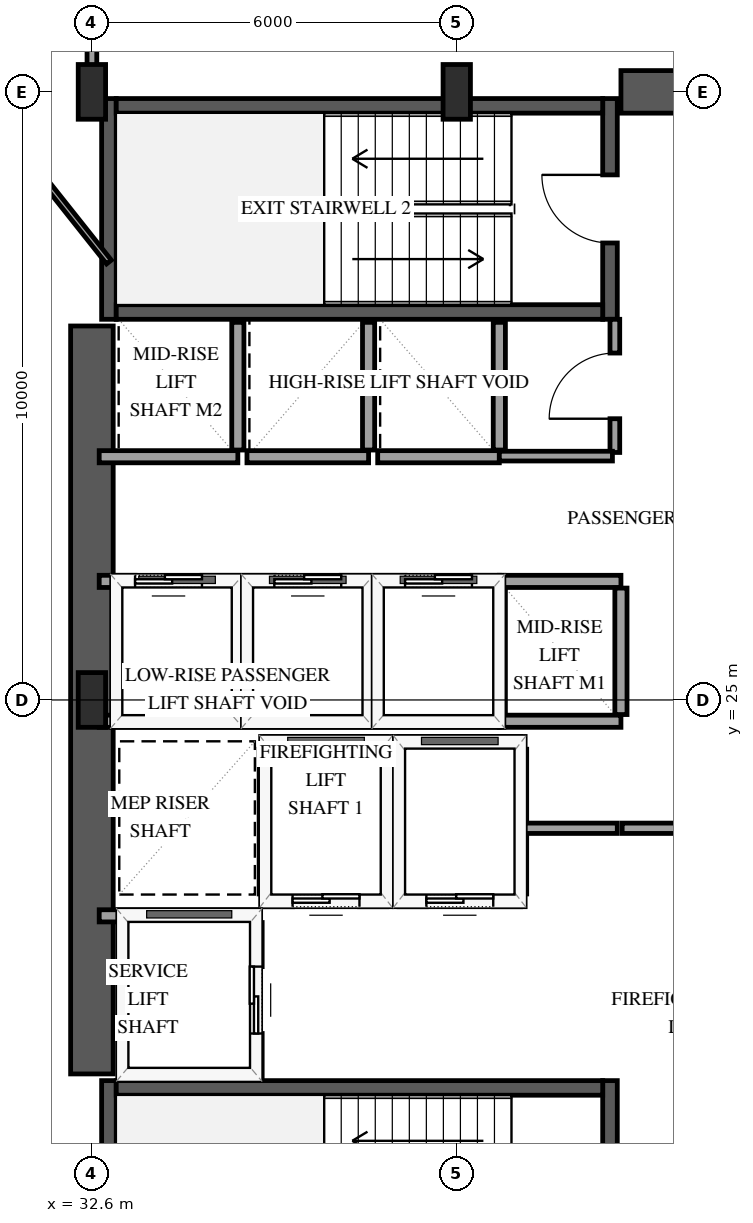
"""IFC4 building model, lengths in metres.
Left out: names, types, materials, properties, quantities, classifications, styles, units other than length and angle.
Written with IfcOpenShell. Run it as: python <this file> out.ifc"""

import sys

from ifc_helpers import new_model, si_unit, direction, frame, frame_2d, origin, origin_2d, place, context, subcontext, project, spatial, rectangle, extrude, element, fill, save


model = new_model("IFC4")
c1 = context("Model", 3, precision=1e-05, world=origin(), true_north=direction((0.0, 1.0)))
c2 = subcontext(c1, "Body", "Model", "MODEL_VIEW")
j1 = project(units=[si_unit("LENGTHUNIT", "METRE"), si_unit("PLANEANGLEUNIT", "RADIAN")], contexts=[c1])
p1 = place(None, origin())
s1 = spatial("IfcSite", under=j1, at=p1, CompositionType="ELEMENT")
p2 = place(p1, origin())
s2 = spatial("IfcBuilding", under=s1, at=p2, CompositionType="ELEMENT")
p3 = place(p2, frame((0.0, 0.0, 42.6)))
s3 = spatial("IfcBuildingStorey", under=s2, at=p3, CompositionType="ELEMENT", Elevation=42.6)
p4 = place(p3, frame((32.88, 15.11, 0.0), z_axis=(0.0, 0.0, 1.0), x_axis=(0.0, 1.0, 0.0)))
e1 = element("IfcWall", 1, at=p4, inside=s3, PredefinedType="SHEAR", context=c2, shape_type="SweptSolid", body=[
    extrude(rectangle(XDim=3.63, YDim=0.24, at=frame_2d((1.815, 0.0))), origin(), (0.0, 0.0, 1.0), 4.0),
])
p5 = place(p3, frame((41.12, 15.11, 0.0), z_axis=(0.0, 0.0, 1.0), x_axis=(0.0, 1.0, 0.0)))
e2 = element("IfcWall", 2, at=p5, inside=s3, PredefinedType="SHEAR", context=c2, shape_type="SweptSolid", body=[
    extrude(rectangle(XDim=3.63, YDim=0.24, at=frame_2d((1.815, 0.0))), origin(), (0.0, 0.0, 1.0), 4.0),
])
p6 = place(p5, frame((1.255, 0.0, 0.0)))
e3 = element("IfcOpeningElement", 3, at=p6, cuts=e2, PredefinedType="OPENING", context=c2, shape_type="SweptSolid", body=[
    extrude(rectangle(XDim=1.12, YDim=2.15, at=frame_2d((0.56, 1.075))), frame((0.0, 0.13, 0.0), z_axis=(0.0, -1.0, 0.0), x_axis=(1.0, 0.0, 0.0)), (0.0, 0.0, 1.0), 0.26),
])
p7 = place(p3, frame((33.0, 18.62, 0.0), z_axis=(0.0, 0.0, 1.0), x_axis=(1.0, 0.0, 0.0)))
e4 = element("IfcWall", 4, at=p7, inside=s3, PredefinedType="SHEAR", context=c2, shape_type="SweptSolid", body=[
    extrude(rectangle(XDim=8.0, YDim=0.24, at=frame_2d((4.0, 0.0))), origin(), (0.0, 0.0, 1.0), 4.0),
])
p8 = place(p3, frame((32.88, 31.26, 0.0), z_axis=(0.0, 0.0, 1.0), x_axis=(0.0, 1.0, 0.0)))
e5 = element("IfcWall", 5, at=p8, inside=s3, PredefinedType="SHEAR", context=c2, shape_type="SweptSolid", body=[
    extrude(rectangle(XDim=3.63, YDim=0.24, at=frame_2d((1.815, 0.0))), origin(), (0.0, 0.0, 1.0), 4.0),
])
p9 = place(p3, frame((41.12, 31.26, 0.0), z_axis=(0.0, 0.0, 1.0), x_axis=(0.0, 1.0, 0.0)))
e6 = element("IfcWall", 6, at=p9, inside=s3, PredefinedType="SHEAR", context=c2, shape_type="SweptSolid", body=[
    extrude(rectangle(XDim=3.63, YDim=0.24, at=frame_2d((1.815, 0.0))), origin(), (0.0, 0.0, 1.0), 4.0),
])
p10 = place(p9, frame((1.255, 0.0, 0.0)))
e7 = element("IfcOpeningElement", 7, at=p10, cuts=e6, PredefinedType="OPENING", context=c2, shape_type="SweptSolid", body=[
    extrude(rectangle(XDim=1.12, YDim=2.15, at=frame_2d((0.56, 1.075))), frame((0.0, 0.13, 0.0), z_axis=(0.0, -1.0, 0.0), x_axis=(1.0, 0.0, 0.0)), (0.0, 0.0, 1.0), 0.26),
])
for number, where, z_axis, x_axis in (
    (8, (33.0, 31.38, 0.0), (0.0, 0.0, 1.0), (1.0, 0.0, 0.0)),
    (9, (33.0, 34.77, 0.0), (0.0, 0.0, 1.0), (1.0, 0.0, 0.0)),
):
    element("IfcWall", number, at=place(p3, frame(where, z_axis=z_axis, x_axis=x_axis)), inside=s3, PredefinedType="SHEAR", context=c2, shape_type="SweptSolid", body=[
        extrude(rectangle(XDim=8.0, YDim=0.24, at=frame_2d((4.0, 0.0))), origin(), (0.0, 0.0, 1.0), 4.0),
    ])
p11 = place(p3, frame((32.6, 18.85, 0.0), z_axis=(0.0, 0.0, 1.0), x_axis=(0.0, 1.0, 0.0)))
e10 = element("IfcWall", 10, at=p11, inside=s3, PredefinedType="SHEAR", context=c2, shape_type="SweptSolid", body=[
    extrude(rectangle(XDim=12.3, YDim=0.7, at=frame_2d((6.15, 0.0))), origin(), (0.0, 0.0, 1.0), 4.0),
])
p12 = place(p3, frame((41.3, 35.0, 0.0), z_axis=(0.0, 0.0, 1.0), x_axis=(1.0, 0.0, 0.0)))
e11 = element("IfcWall", 11, at=p12, inside=s3, PredefinedType="SHEAR", context=c2, shape_type="SweptSolid", body=[
    extrude(rectangle(XDim=2.85, YDim=0.7, at=frame_2d((1.425, 0.0))), origin(), (0.0, 0.0, 1.0), 4.0),
])
for number, where, z_axis, x_axis in (
    (12, (32.6, 25.0, 0.0), (0.0, 0.0, 1.0), (1.0, 0.0, 0.0)),
    (13, (32.6, 35.0, 0.0), (0.0, 0.0, 1.0), (1.0, 0.0, 0.0)),
    (14, (38.6, 35.0, 0.0), (0.0, 0.0, 1.0), (1.0, 0.0, 0.0)),
):
    element("IfcColumn", number, at=place(p3, frame(where, z_axis=z_axis, x_axis=x_axis)), inside=s3, PredefinedType="PILASTER", context=c2, shape_type="SweptSolid", body=[
        extrude(rectangle(XDim=0.45, YDim=0.9, at=origin_2d()), origin(), (0.0, 0.0, 1.0), 4.0),
    ])
p13 = place(p3, frame((35.45, 21.7, 0.0), z_axis=(0.0, 0.0, 1.0), x_axis=(1.0, 0.0, 0.0)))
e15 = element("IfcWall", 15, at=p13, inside=s3, PredefinedType="SOLIDWALL", context=c2, shape_type="SweptSolid", body=[
    extrude(rectangle(XDim=2.0, YDim=0.2, at=frame_2d((1.0, 0.0))), origin(), (0.0, 0.0, 1.0), 3.7),
])
p14 = place(p13, frame((0.45, 0.0, 0.0)))
e16 = element("IfcOpeningElement", 16, at=p14, cuts=e15, PredefinedType="OPENING", context=c2, shape_type="SweptSolid", body=[
    extrude(rectangle(XDim=1.1, YDim=2.15, at=frame_2d((0.55, 1.075))), frame((0.0, 0.11, 0.0), z_axis=(0.0, -1.0, 0.0), x_axis=(1.0, 0.0, 0.0)), (0.0, 0.0, 1.0), 0.22),
])
p15 = place(p3, frame((35.45, 24.3, 0.0), z_axis=(0.0, 0.0, 1.0), x_axis=(1.0, 0.0, 0.0)))
e17 = element("IfcWall", 17, at=p15, inside=s3, PredefinedType="SOLIDWALL", context=c2, shape_type="SweptSolid", body=[
    extrude(rectangle(XDim=2.0, YDim=0.2, at=frame_2d((1.0, 0.0))), origin(), (0.0, 0.0, 1.0), 3.7),
])
for number, where, z_axis, x_axis in (
    (18, (35.45, 21.81, 0.0), (0.0, 0.0, 1.0), (0.0, 1.0, 0.0)),
    (19, (37.45, 21.81, 0.0), (0.0, 0.0, 1.0), (0.0, 1.0, 0.0)),
):
    element("IfcWall", number, at=place(p3, frame(where, z_axis=z_axis, x_axis=x_axis)), inside=s3, PredefinedType="SOLIDWALL", context=c2, shape_type="SweptSolid", body=[
        extrude(rectangle(XDim=2.38, YDim=0.2, at=frame_2d((1.19, 0.0))), origin(), (0.0, 0.0, 1.0), 3.7),
    ])
p16 = place(p3, frame((37.65, 21.7, 0.0), z_axis=(0.0, 0.0, 1.0), x_axis=(1.0, 0.0, 0.0)))
e20 = element("IfcWall", 20, at=p16, inside=s3, PredefinedType="SOLIDWALL", context=c2, shape_type="SweptSolid", body=[
    extrude(rectangle(XDim=2.0, YDim=0.2, at=frame_2d((1.0, 0.0))), origin(), (0.0, 0.0, 1.0), 3.7),
])
p17 = place(p16, frame((0.45, 0.0, 0.0)))
e21 = element("IfcOpeningElement", 21, at=p17, cuts=e20, PredefinedType="OPENING", context=c2, shape_type="SweptSolid", body=[
    extrude(rectangle(XDim=1.1, YDim=2.15, at=frame_2d((0.55, 1.075))), frame((0.0, 0.11, 0.0), z_axis=(0.0, -1.0, 0.0), x_axis=(1.0, 0.0, 0.0)), (0.0, 0.0, 1.0), 0.22),
])
p18 = place(p3, frame((37.65, 24.3, 0.0), z_axis=(0.0, 0.0, 1.0), x_axis=(1.0, 0.0, 0.0)))
e22 = element("IfcWall", 22, at=p18, inside=s3, PredefinedType="SOLIDWALL", context=c2, shape_type="SweptSolid", body=[
    extrude(rectangle(XDim=2.0, YDim=0.2, at=frame_2d((1.0, 0.0))), origin(), (0.0, 0.0, 1.0), 3.7),
])
p19 = place(p3, frame((39.65, 21.81, 0.0), z_axis=(0.0, 0.0, 1.0), x_axis=(0.0, 1.0, 0.0)))
e23 = element("IfcWall", 23, at=p19, inside=s3, PredefinedType="SOLIDWALL", context=c2, shape_type="SweptSolid", body=[
    extrude(rectangle(XDim=2.38, YDim=0.2, at=frame_2d((1.19, 0.0))), origin(), (0.0, 0.0, 1.0), 3.7),
])
p20 = place(p3, frame((32.72, 21.45, 0.0), z_axis=(0.0, 0.0, 1.0), x_axis=(1.0, 0.0, 0.0)))
e24 = element("IfcWall", 24, at=p20, inside=s3, PredefinedType="SOLIDWALL", context=c2, shape_type="SweptSolid", body=[
    extrude(rectangle(XDim=2.58, YDim=0.2, at=frame_2d((1.29, 0.0))), origin(), (0.0, 0.0, 1.0), 3.7),
])
p21 = place(p3, frame((35.3, 18.79, 0.0), z_axis=(0.0, 0.0, 1.0), x_axis=(0.0, 1.0, 0.0)))
e25 = element("IfcWall", 25, at=p21, inside=s3, PredefinedType="SOLIDWALL", context=c2, shape_type="SweptSolid", body=[
    extrude(rectangle(XDim=2.55, YDim=0.2, at=frame_2d((1.275, 0.0))), origin(), (0.0, 0.0, 1.0), 3.7),
])
p22 = place(p21, frame((0.725, 0.0, 0.0)))
e26 = element("IfcOpeningElement", 26, at=p22, cuts=e25, PredefinedType="OPENING", context=c2, shape_type="SweptSolid", body=[
    extrude(rectangle(XDim=1.1, YDim=2.15, at=frame_2d((0.55, 1.075))), frame((0.0, 0.11, 0.0), z_axis=(0.0, -1.0, 0.0), x_axis=(1.0, 0.0, 0.0)), (0.0, 0.0, 1.0), 0.22),
])
p23 = place(p3, frame((32.72, 24.65, 0.0), z_axis=(0.0, 0.0, 1.0), x_axis=(1.0, 0.0, 0.0)))
e27 = element("IfcWall", 27, at=p23, inside=s3, PredefinedType="SOLIDWALL", context=c2, shape_type="SweptSolid", body=[
    extrude(rectangle(XDim=2.28, YDim=0.2, at=frame_2d((1.14, 0.0))), origin(), (0.0, 0.0, 1.0), 3.7),
])
p24 = place(p3, frame((32.72, 26.95, 0.0), z_axis=(0.0, 0.0, 1.0), x_axis=(1.0, 0.0, 0.0)))
e28 = element("IfcWall", 28, at=p24, inside=s3, PredefinedType="SOLIDWALL", context=c2, shape_type="SweptSolid", body=[
    extrude(rectangle(XDim=2.28, YDim=0.2, at=frame_2d((1.14, 0.0))), origin(), (0.0, 0.0, 1.0), 3.7),
])
p25 = place(p24, frame((0.59, 0.0, 0.0)))
e29 = element("IfcOpeningElement", 29, at=p25, cuts=e28, PredefinedType="OPENING", context=c2, shape_type="SweptSolid", body=[
    extrude(rectangle(XDim=1.1, YDim=2.15, at=frame_2d((0.55, 1.075))), frame((0.0, 0.11, 0.0), z_axis=(0.0, -1.0, 0.0), x_axis=(1.0, 0.0, 0.0)), (0.0, 0.0, 1.0), 0.22),
])
p26 = place(p3, frame((35.0, 24.76, 0.0), z_axis=(0.0, 0.0, 1.0), x_axis=(0.0, 1.0, 0.0)))
e30 = element("IfcWall", 30, at=p26, inside=s3, PredefinedType="SOLIDWALL", context=c2, shape_type="SweptSolid", body=[
    extrude(rectangle(XDim=2.08, YDim=0.2, at=frame_2d((1.04, 0.0))), origin(), (0.0, 0.0, 1.0), 3.7),
])
p27 = place(p3, frame((35.15, 24.65, 0.0), z_axis=(0.0, 0.0, 1.0), x_axis=(1.0, 0.0, 0.0)))
e31 = element("IfcWall", 31, at=p27, inside=s3, PredefinedType="SOLIDWALL", context=c2, shape_type="SweptSolid", body=[
    extrude(rectangle(XDim=2.0, YDim=0.2, at=frame_2d((1.0, 0.0))), origin(), (0.0, 0.0, 1.0), 3.7),
])
p28 = place(p3, frame((35.15, 26.95, 0.0), z_axis=(0.0, 0.0, 1.0), x_axis=(1.0, 0.0, 0.0)))
e32 = element("IfcWall", 32, at=p28, inside=s3, PredefinedType="SOLIDWALL", context=c2, shape_type="SweptSolid", body=[
    extrude(rectangle(XDim=2.0, YDim=0.2, at=frame_2d((1.0, 0.0))), origin(), (0.0, 0.0, 1.0), 3.7),
])
p29 = place(p28, frame((0.45, 0.0, 0.0)))
e33 = element("IfcOpeningElement", 33, at=p29, cuts=e32, PredefinedType="OPENING", context=c2, shape_type="SweptSolid", body=[
    extrude(rectangle(XDim=1.1, YDim=2.15, at=frame_2d((0.55, 1.075))), frame((0.0, 0.11, 0.0), z_axis=(0.0, -1.0, 0.0), x_axis=(1.0, 0.0, 0.0)), (0.0, 0.0, 1.0), 0.22),
])
p30 = place(p3, frame((37.15, 24.76, 0.0), z_axis=(0.0, 0.0, 1.0), x_axis=(0.0, 1.0, 0.0)))
e34 = element("IfcWall", 34, at=p30, inside=s3, PredefinedType="SOLIDWALL", context=c2, shape_type="SweptSolid", body=[
    extrude(rectangle(XDim=2.08, YDim=0.2, at=frame_2d((1.04, 0.0))), origin(), (0.0, 0.0, 1.0), 3.7),
])
p31 = place(p3, frame((37.3, 24.65, 0.0), z_axis=(0.0, 0.0, 1.0), x_axis=(1.0, 0.0, 0.0)))
e35 = element("IfcWall", 35, at=p31, inside=s3, PredefinedType="SOLIDWALL", context=c2, shape_type="SweptSolid", body=[
    extrude(rectangle(XDim=2.0, YDim=0.2, at=frame_2d((1.0, 0.0))), origin(), (0.0, 0.0, 1.0), 3.7),
])
p32 = place(p3, frame((37.3, 26.95, 0.0), z_axis=(0.0, 0.0, 1.0), x_axis=(1.0, 0.0, 0.0)))
e36 = element("IfcWall", 36, at=p32, inside=s3, PredefinedType="SOLIDWALL", context=c2, shape_type="SweptSolid", body=[
    extrude(rectangle(XDim=2.0, YDim=0.2, at=frame_2d((1.0, 0.0))), origin(), (0.0, 0.0, 1.0), 3.7),
])
p33 = place(p32, frame((0.45, 0.0, 0.0)))
e37 = element("IfcOpeningElement", 37, at=p33, cuts=e36, PredefinedType="OPENING", context=c2, shape_type="SweptSolid", body=[
    extrude(rectangle(XDim=1.1, YDim=2.15, at=frame_2d((0.55, 1.075))), frame((0.0, 0.11, 0.0), z_axis=(0.0, -1.0, 0.0), x_axis=(1.0, 0.0, 0.0)), (0.0, 0.0, 1.0), 0.22),
])
p34 = place(p3, frame((39.3, 24.76, 0.0), z_axis=(0.0, 0.0, 1.0), x_axis=(0.0, 1.0, 0.0)))
e38 = element("IfcWall", 38, at=p34, inside=s3, PredefinedType="SOLIDWALL", context=c2, shape_type="SweptSolid", body=[
    extrude(rectangle(XDim=2.08, YDim=0.2, at=frame_2d((1.04, 0.0))), origin(), (0.0, 0.0, 1.0), 3.7),
])
for number, where, z_axis, x_axis in (
    (39, (39.3, 24.65, 0.0), (0.0, 0.0, 1.0), (1.0, 0.0, 0.0)),
    (40, (39.3, 26.95, 0.0), (0.0, 0.0, 1.0), (1.0, 0.0, 0.0)),
):
    element("IfcWall", number, at=place(p3, frame(where, z_axis=z_axis, x_axis=x_axis)), inside=s3, PredefinedType="SOLIDWALL", context=c2, shape_type="SweptSolid", body=[
        extrude(rectangle(XDim=2.0, YDim=0.2, at=frame_2d((1.0, 0.0))), origin(), (0.0, 0.0, 1.0), 3.7),
    ])
p35 = place(p3, frame((41.3, 24.76, 0.0), z_axis=(0.0, 0.0, 1.0), x_axis=(0.0, 1.0, 0.0)))
e41 = element("IfcWall", 41, at=p35, inside=s3, PredefinedType="SOLIDWALL", context=c2, shape_type="SweptSolid", body=[
    extrude(rectangle(XDim=2.08, YDim=0.2, at=frame_2d((1.04, 0.0))), origin(), (0.0, 0.0, 1.0), 3.7),
])
p36 = place(p3, frame((32.72, 29.0, 0.0), z_axis=(0.0, 0.0, 1.0), x_axis=(1.0, 0.0, 0.0)))
e42 = element("IfcWall", 42, at=p36, inside=s3, PredefinedType="SOLIDWALL", context=c2, shape_type="SweptSolid", body=[
    extrude(rectangle(XDim=2.28, YDim=0.2, at=frame_2d((1.14, 0.0))), origin(), (0.0, 0.0, 1.0), 3.7),
])
p37 = place(p3, frame((35.0, 29.11, 0.0), z_axis=(0.0, 0.0, 1.0), x_axis=(0.0, 1.0, 0.0)))
e43 = element("IfcWall", 43, at=p37, inside=s3, PredefinedType="SOLIDWALL", context=c2, shape_type="SweptSolid", body=[
    extrude(rectangle(XDim=2.1, YDim=0.2, at=frame_2d((1.05, 0.0))), origin(), (0.0, 0.0, 1.0), 3.7),
])
p38 = place(p3, frame((35.15, 29.0, 0.0), z_axis=(0.0, 0.0, 1.0), x_axis=(1.0, 0.0, 0.0)))
e44 = element("IfcWall", 44, at=p38, inside=s3, PredefinedType="SOLIDWALL", context=c2, shape_type="SweptSolid", body=[
    extrude(rectangle(XDim=2.0, YDim=0.2, at=frame_2d((1.0, 0.0))), origin(), (0.0, 0.0, 1.0), 3.7),
])
p39 = place(p3, frame((37.15, 29.11, 0.0), z_axis=(0.0, 0.0, 1.0), x_axis=(0.0, 1.0, 0.0)))
e45 = element("IfcWall", 45, at=p39, inside=s3, PredefinedType="SOLIDWALL", context=c2, shape_type="SweptSolid", body=[
    extrude(rectangle(XDim=2.1, YDim=0.2, at=frame_2d((1.05, 0.0))), origin(), (0.0, 0.0, 1.0), 3.7),
])
p40 = place(p3, frame((37.3, 29.0, 0.0), z_axis=(0.0, 0.0, 1.0), x_axis=(1.0, 0.0, 0.0)))
e46 = element("IfcWall", 46, at=p40, inside=s3, PredefinedType="SOLIDWALL", context=c2, shape_type="SweptSolid", body=[
    extrude(rectangle(XDim=2.0, YDim=0.2, at=frame_2d((1.0, 0.0))), origin(), (0.0, 0.0, 1.0), 3.7),
])
p41 = place(p3, frame((39.3, 29.11, 0.0), z_axis=(0.0, 0.0, 1.0), x_axis=(0.0, 1.0, 0.0)))
e47 = element("IfcWall", 47, at=p41, inside=s3, PredefinedType="SOLIDWALL", context=c2, shape_type="SweptSolid", body=[
    extrude(rectangle(XDim=2.1, YDim=0.2, at=frame_2d((1.05, 0.0))), origin(), (0.0, 0.0, 1.0), 3.7),
])
p42 = place(p3, frame((32.88, 32.202, 0.0), z_axis=(0.0, 0.0, 1.0), x_axis=(-0.621839537778, 0.783144679645, 0.0)))
e48 = element("IfcWall", 48, at=p42, inside=s3, PredefinedType="PARTITIONING", context=c2, shape_type="SweptSolid", body=[
    extrude(rectangle(XDim=7.132, YDim=0.1, at=frame_2d((3.566, 0.0))), origin(), (0.0, 0.0, 1.0), 3.7),
])
p43 = place(p3, frame((41.32, 22.89, 0.0), z_axis=(0.0, 0.0, 1.0), x_axis=(1.0, 0.0, 0.0)))
e49 = element("IfcWall", 49, at=p43, inside=s3, PredefinedType="PARTITIONING", context=c2, shape_type="SweptSolid", body=[
    extrude(rectangle(XDim=3.24, YDim=0.17, at=frame_2d((1.62, 0.0))), origin(), (0.0, 0.0, 1.0), 3.7),
])
p44 = place(p43, frame((1.08, 0.0, 0.0)))
e50 = element("IfcOpeningElement", 50, at=p44, cuts=e49, PredefinedType="OPENING", context=c2, shape_type="SweptSolid", body=[
    extrude(rectangle(XDim=1.08, YDim=2.15, at=frame_2d((0.54, 1.075))), frame((0.0, 0.095, 0.0), z_axis=(0.0, -1.0, 0.0), x_axis=(1.0, 0.0, 0.0)), (0.0, 0.0, 1.0), 0.19),
])
p45 = place(p3, frame((41.2, 29.07, 0.0), z_axis=(0.0, 0.0, 1.0), x_axis=(0.0, 1.0, 0.0)))
e51 = element("IfcWall", 51, at=p45, inside=s3, PredefinedType="PARTITIONING", context=c2, shape_type="SweptSolid", body=[
    extrude(rectangle(XDim=2.19, YDim=0.16, at=frame_2d((1.095, 0.0))), origin(), (0.0, 0.0, 1.0), 3.7),
])
p46 = place(p45, frame((0.555, 0.0, 0.0)))
e52 = element("IfcOpeningElement", 52, at=p46, cuts=e51, PredefinedType="OPENING", context=c2, shape_type="SweptSolid", body=[
    extrude(rectangle(XDim=1.08, YDim=2.15, at=frame_2d((0.54, 1.075))), frame((0.0, 0.09, 0.0), z_axis=(0.0, -1.0, 0.0), x_axis=(1.0, 0.0, 0.0)), (0.0, 0.0, 1.0), 0.18),
])
p47 = place(p3, frame((32.6, 35.07, 0.0), z_axis=(0.0, 0.0, 1.0), x_axis=(0.0, 1.0, 0.0)))
e53 = element("IfcWall", 53, at=p47, inside=s3, PredefinedType="PARTITIONING", context=c2, shape_type="SweptSolid", body=[
    extrude(rectangle(XDim=1.91, YDim=0.16, at=frame_2d((0.955, 0.0))), origin(), (0.0, 0.0, 1.0), 3.7),
])
p48 = place(p3, frame((39.3, 29.01, 0.0), z_axis=(0.0, 0.0, 1.0), x_axis=(1.0, 0.0, 0.0)))
e54 = element("IfcWall", 54, at=p48, inside=s3, PredefinedType="PARTITIONING", context=c2, shape_type="SweptSolid", body=[
    extrude(rectangle(XDim=1.86, YDim=0.16, at=frame_2d((0.93, 0.0))), origin(), (0.0, 0.0, 1.0), 3.7),
])
p49 = place(p3, frame((39.72, 22.89, 0.0), z_axis=(0.0, 0.0, 1.0), x_axis=(1.0, 0.0, 0.0)))
e55 = element("IfcWall", 55, at=p49, inside=s3, PredefinedType="PARTITIONING", context=c2, shape_type="SweptSolid", body=[
    extrude(rectangle(XDim=1.52, YDim=0.17, at=frame_2d((0.76, 0.0))), origin(), (0.0, 0.0, 1.0), 3.7),
])
p50 = place(p14, origin())
e56 = element("IfcDoor", 56, at=p50, inside=s3, OperationType="SLIDING_TO_LEFT", PredefinedType="DOOR", context=c2, shape_type="SweptSolid", body=[
    extrude(rectangle(XDim=1.1, YDim=2.15, at=frame_2d((0.55, 1.075))), frame((0.0, 0.025, 0.0), z_axis=(0.0, -1.0, 0.0), x_axis=(1.0, 0.0, 0.0)), (0.0, 0.0, 1.0), 0.05),
])
fill(e16, e56)
p51 = place(p17, origin())
e57 = element("IfcDoor", 57, at=p51, inside=s3, OperationType="SLIDING_TO_LEFT", PredefinedType="DOOR", context=c2, shape_type="SweptSolid", body=[
    extrude(rectangle(XDim=1.1, YDim=2.15, at=frame_2d((0.55, 1.075))), frame((0.0, 0.025, 0.0), z_axis=(0.0, -1.0, 0.0), x_axis=(1.0, 0.0, 0.0)), (0.0, 0.0, 1.0), 0.05),
])
fill(e21, e57)
p52 = place(p22, origin())
e58 = element("IfcDoor", 58, at=p52, inside=s3, OperationType="SLIDING_TO_LEFT", PredefinedType="DOOR", context=c2, shape_type="SweptSolid", body=[
    extrude(rectangle(XDim=1.1, YDim=2.15, at=frame_2d((0.55, 1.075))), frame((0.0, 0.025, 0.0), z_axis=(0.0, -1.0, 0.0), x_axis=(1.0, 0.0, 0.0)), (0.0, 0.0, 1.0), 0.05),
])
fill(e26, e58)
p53 = place(p25, origin())
e59 = element("IfcDoor", 59, at=p53, inside=s3, OperationType="SLIDING_TO_LEFT", PredefinedType="DOOR", context=c2, shape_type="SweptSolid", body=[
    extrude(rectangle(XDim=1.1, YDim=2.15, at=frame_2d((0.55, 1.075))), frame((0.0, 0.025, 0.0), z_axis=(0.0, -1.0, 0.0), x_axis=(1.0, 0.0, 0.0)), (0.0, 0.0, 1.0), 0.05),
])
fill(e29, e59)
p54 = place(p29, origin())
e60 = element("IfcDoor", 60, at=p54, inside=s3, OperationType="SLIDING_TO_LEFT", PredefinedType="DOOR", context=c2, shape_type="SweptSolid", body=[
    extrude(rectangle(XDim=1.1, YDim=2.15, at=frame_2d((0.55, 1.075))), frame((0.0, 0.025, 0.0), z_axis=(0.0, -1.0, 0.0), x_axis=(1.0, 0.0, 0.0)), (0.0, 0.0, 1.0), 0.05),
])
fill(e33, e60)
p55 = place(p33, origin())
e61 = element("IfcDoor", 61, at=p55, inside=s3, OperationType="SLIDING_TO_LEFT", PredefinedType="DOOR", context=c2, shape_type="SweptSolid", body=[
    extrude(rectangle(XDim=1.1, YDim=2.15, at=frame_2d((0.55, 1.075))), frame((0.0, 0.025, 0.0), z_axis=(0.0, -1.0, 0.0), x_axis=(1.0, 0.0, 0.0)), (0.0, 0.0, 1.0), 0.05),
])
fill(e37, e61)
p56 = place(p10, origin())
e62 = element("IfcDoor", 62, at=p56, inside=s3, OperationType="SINGLE_SWING_RIGHT", PredefinedType="DOOR", context=c2, shape_type="SweptSolid", body=[
    extrude(rectangle(XDim=1.12, YDim=2.15, at=frame_2d((0.56, 1.075))), frame((0.0, 0.025, 0.0), z_axis=(0.0, -1.0, 0.0), x_axis=(1.0, 0.0, 0.0)), (0.0, 0.0, 1.0), 0.05),
])
fill(e7, e62)
p57 = place(p46, origin())
e63 = element("IfcDoor", 63, at=p57, inside=s3, OperationType="SINGLE_SWING_LEFT", PredefinedType="DOOR", context=c2, shape_type="SweptSolid", body=[
    extrude(rectangle(XDim=1.08, YDim=2.15, at=frame_2d((0.54, 1.075))), frame((0.0, 0.025, 0.0), z_axis=(0.0, -1.0, 0.0), x_axis=(1.0, 0.0, 0.0)), (0.0, 0.0, 1.0), 0.05),
])
fill(e52, e63)
save(model, sys.argv[1])
